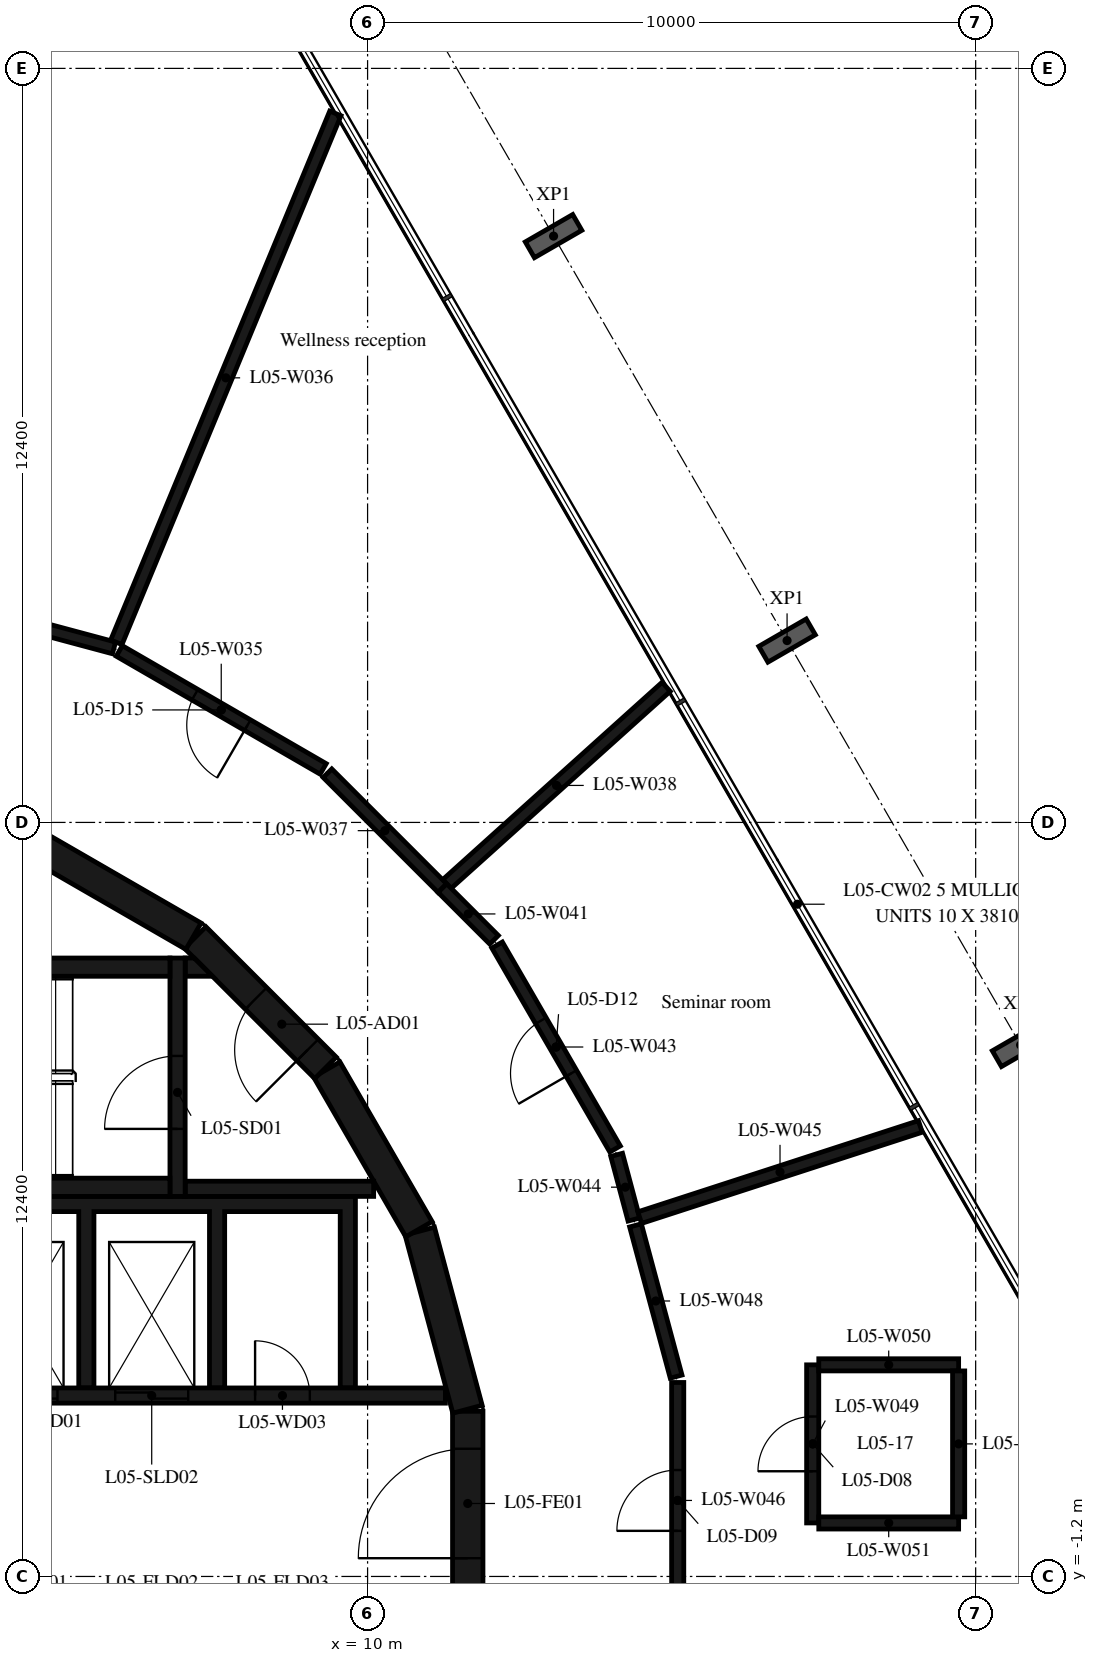
"""IFC4 building model, lengths in metres.
Left out: names, types, materials, properties, quantities, classifications, styles, units other than length and angle.
Written with IfcOpenShell. Run it as: python <this file> out.ifc"""

import sys

from ifc_helpers import new_model, si_unit, direction, frame, frame_2d, origin, origin_2d, place, context, subcontext, project, spatial, polyline, rectangle, i_section, outline, extrude, element, fill, save


model = new_model("IFC4")
c1 = context("Model", 3, precision=1e-05, world=origin(), true_north=direction((0.0, 1.0)))
c2 = subcontext(c1, "Body", "Model", "MODEL_VIEW")
j1 = project(units=[si_unit("LENGTHUNIT", "METRE"), si_unit("PLANEANGLEUNIT", "RADIAN")], contexts=[c1])
p1 = place(None, origin())
s1 = spatial("IfcSite", under=j1, at=p1, CompositionType="ELEMENT")
p2 = place(p1, origin())
s2 = spatial("IfcBuilding", under=s1, at=p2, CompositionType="ELEMENT")
p3 = place(p2, frame((0.0, 0.0, 28.2)))
s3 = spatial("IfcBuildingStorey", under=s2, at=p3, CompositionType="ELEMENT", Elevation=28.2)
for number, where, z_axis, x_axis in (
    (1, (20.739, 7.539, -0.38), (0.0, 0.0, 1.0), (0.5, -0.866, 0.0)),
    (2, (16.899, 14.19, -0.38), (0.0, 0.0, 1.0), (0.5, -0.866, 0.0)),
    (3, (13.059, 20.842, -0.38), (0.0, 0.0, 1.0), (0.5, -0.866, 0.0)),
):
    element("IfcColumn", number, at=place(p3, frame(where, z_axis=z_axis, x_axis=x_axis)), inside=s3, PredefinedType="COLUMN", context=c2, shape_type="SweptSolid", body=[
        extrude(i_section(OverallWidth=0.3, OverallDepth=0.9, WebThickness=0.019, FlangeThickness=0.035, FilletRadius=0.03, at=origin_2d()), origin(), (0.0, 0.0, 1.0), 4.73),
    ])
p4 = place(p3, frame((11.647, -1.516, 0.0), z_axis=(0.0, 0.0, 1.0), x_axis=(0.0, 1.0, 0.0)))
e4 = element("IfcWall", 4, at=p4, inside=s3, PredefinedType="SHEAR", context=c2, shape_type="SweptSolid", body=[
    extrude(rectangle(XDim=3.033, YDim=0.5, at=frame_2d((1.516, 0.0))), origin(), (0.0, 0.0, 1.0), 4.35),
])
p5 = place(p4, frame((0.616, 0.0, 0.0)))
e5 = element("IfcOpeningElement", 5, at=p5, cuts=e4, PredefinedType="OPENING", context=c2, shape_type="SweptSolid", body=[
    extrude(rectangle(XDim=1.8, YDim=2.1, at=frame_2d((0.9, 1.05))), frame((0.0, 0.26, 0.0), z_axis=(0.0, -1.0, 0.0), x_axis=(1.0, 0.0, 0.0)), (0.0, 0.0, 1.0), 0.52),
])
for number, where, z_axis, x_axis in (
    (6, (11.643, 1.55, 0.0), (0.0, 0.0, 1.0), (-0.259, 0.966, 0.0)),
    (7, (10.845, 4.51, 0.0), (0.0, 0.0, 1.0), (-0.5, 0.866, 0.0)),
):
    element("IfcWall", number, at=place(p3, frame(where, z_axis=z_axis, x_axis=x_axis)), inside=s3, PredefinedType="SHEAR", context=c2, shape_type="SweptSolid", body=[
        extrude(rectangle(XDim=3.033, YDim=0.5, at=frame_2d((1.516, 0.0))), origin(), (0.0, 0.0, 1.0), 4.35),
    ])
p6 = place(p3, frame((9.308, 7.164, 0.0), z_axis=(0.0, 0.0, 1.0), x_axis=(-0.707106781187, 0.707106781187, 0.0)))
e8 = element("IfcWall", 8, at=p6, inside=s3, PredefinedType="SHEAR", context=c2, shape_type="SweptSolid", body=[
    extrude(rectangle(XDim=3.032, YDim=0.5, at=frame_2d((1.516, 0.0))), origin(), (0.0, 0.0, 1.0), 4.35),
])
p7 = place(p6, frame((0.416, 0.0, 0.0)))
e9 = element("IfcOpeningElement", 9, at=p7, cuts=e8, PredefinedType="OPENING", context=c2, shape_type="SweptSolid", body=[
    extrude(rectangle(XDim=1.2, YDim=2.1, at=frame_2d((0.6, 1.05))), frame((0.0, 0.26, 0.0), z_axis=(0.0, -1.0, 0.0), x_axis=(1.0, 0.0, 0.0)), (0.0, 0.0, 1.0), 0.52),
])
p8 = place(p3, frame((7.137, 9.329, 0.0), z_axis=(0.0, 0.0, 1.0), x_axis=(-0.865975092491, 0.500087131594, 0.0)))
e10 = element("IfcWall", 10, at=p8, inside=s3, PredefinedType="SHEAR", context=c2, shape_type="SweptSolid", body=[
    extrude(rectangle(XDim=3.033, YDim=0.5, at=frame_2d((1.516, 0.0))), origin(), (0.0, 0.0, 1.0), 4.35),
])
for number, where, z_axis, x_axis in (
    (11, (0.0, 5.2, 0.0), (0.0, 0.0, 1.0), (1.0, 0.0, 0.0)),
    (12, (0.0, 8.82, 0.0), (0.0, 0.0, 1.0), (1.0, 0.0, 0.0)),
):
    element("IfcWall", number, at=place(p3, frame(where, z_axis=z_axis, x_axis=x_axis)), inside=s3, PredefinedType="SHEAR", context=c2, shape_type="SweptSolid", body=[
        extrude(rectangle(XDim=6.75, YDim=0.3, at=frame_2d((3.375, 0.0))), origin(), (0.0, 0.0, 1.0), 4.35),
    ])
p9 = place(p3, frame((6.875, 5.05, 0.0), z_axis=(0.0, 0.0, 1.0), x_axis=(0.0, 1.0, 0.0)))
e13 = element("IfcWall", 13, at=p9, inside=s3, PredefinedType="SHEAR", context=c2, shape_type="SweptSolid", body=[
    extrude(rectangle(XDim=3.92, YDim=0.25, at=frame_2d((1.96, 0.0))), origin(), (0.0, 0.0, 1.0), 4.35),
])
p10 = place(p9, frame((1.11, 0.0, 0.0)))
e14 = element("IfcOpeningElement", 14, at=p10, cuts=e13, PredefinedType="OPENING", context=c2, shape_type="SweptSolid", body=[
    extrude(rectangle(XDim=1.2, YDim=2.1, at=frame_2d((0.6, 1.05))), frame((0.0, 0.135, 0.0), z_axis=(0.0, -1.0, 0.0), x_axis=(1.0, 0.0, 0.0)), (0.0, 0.0, 1.0), 0.27),
])
p11 = place(p3, frame((7.0, 5.175, 0.0), z_axis=(0.0, 0.0, 1.0), x_axis=(1.0, 0.0, 0.0)))
e15 = element("IfcWall", 15, at=p11, inside=s3, PredefinedType="SHEAR", context=c2, shape_type="SweptSolid", body=[
    extrude(rectangle(XDim=3.1, YDim=0.25, at=frame_2d((1.55, 0.0))), origin(), (0.0, 0.0, 1.0), 4.35),
])
p12 = place(p3, origin())
e16 = element("IfcWall", 16, at=p12, inside=s3, PredefinedType="SHEAR", context=c2, shape_type="SweptSolid", body=[
    extrude(outline(polyline([(7.448, 8.67), (7.0, 8.67), (7.0, 8.97), (7.148, 8.97), (7.448, 8.67)])), origin(), (0.0, 0.0, 1.0), 4.35),
])
p13 = place(p3, origin())
e17 = element("IfcWall", 17, at=p13, inside=s3, PredefinedType="SHEAR", context=c2, shape_type="SweptSolid", body=[
    extrude(outline(polyline([(-9.55, 4.8), (-7.65, 4.8), (-7.65, 1.9), (-7.4, 1.9), (-7.4, 4.8), (-5.5, 4.8), (-5.5, 1.9), (-5.25, 1.9), (-5.25, 4.8), (-3.35, 4.8), (-3.35, 1.9), (-3.1, 1.9), (-3.1, 4.8), (-1.2, 4.8), (-1.2, 1.9), (-0.95, 1.9), (-0.95, 4.8), (0.95, 4.8), (0.95, 1.9), (1.2, 1.9), (1.2, 4.8), (3.1, 4.8), (3.1, 1.9), (3.35, 1.9), (3.35, 4.8), (5.25, 4.8), (5.25, 1.9), (5.5, 1.9), (5.5, 4.8), (7.4, 4.8), (7.4, 1.9), (7.65, 1.9), (7.65, 4.8), (9.55, 4.8), (9.55, 1.9), (9.8, 1.9), (9.8, 4.8), (9.8, 5.05), (-9.8, 5.05), (-9.8, 4.8), (-9.8, 1.9), (-9.55, 1.9), (-9.55, 4.8)])), origin(), (0.0, 0.0, 1.0), 4.35),
])
p14 = place(p3, frame((3.35, 1.775, 0.0), z_axis=(0.0, 0.0, 1.0), x_axis=(1.0, 0.0, 0.0)))
e18 = element("IfcWall", 18, at=p14, inside=s3, PredefinedType="SHEAR", context=c2, shape_type="SweptSolid", body=[
    extrude(rectangle(XDim=7.93, YDim=0.25, at=frame_2d((3.965, 0.0))), origin(), (0.0, 0.0, 1.0), 4.35),
])
p15 = place(p14, frame((0.35, 0.0, 0.0)))
e19 = element("IfcOpeningElement", 19, at=p15, cuts=e18, PredefinedType="OPENING", context=c2, shape_type="SweptSolid", body=[
    extrude(rectangle(XDim=1.2, YDim=2.4, at=frame_2d((0.6, 1.2))), frame((0.0, 0.135, 0.0), z_axis=(0.0, -1.0, 0.0), x_axis=(1.0, 0.0, 0.0)), (0.0, 0.0, 1.0), 0.27),
])
p16 = place(p14, frame((2.5, 0.0, 0.0)))
e20 = element("IfcOpeningElement", 20, at=p16, cuts=e18, PredefinedType="OPENING", context=c2, shape_type="SweptSolid", body=[
    extrude(rectangle(XDim=1.2, YDim=2.4, at=frame_2d((0.6, 1.2))), frame((0.0, 0.135, 0.0), z_axis=(0.0, -1.0, 0.0), x_axis=(1.0, 0.0, 0.0)), (0.0, 0.0, 1.0), 0.27),
])
p17 = place(p14, frame((4.8, 0.0, 0.0)))
e21 = element("IfcOpeningElement", 21, at=p17, cuts=e18, PredefinedType="OPENING", context=c2, shape_type="SweptSolid", body=[
    extrude(rectangle(XDim=0.9, YDim=2.1, at=frame_2d((0.45, 1.05))), frame((0.0, 0.135, 0.0), z_axis=(0.0, -1.0, 0.0), x_axis=(1.0, 0.0, 0.0)), (0.0, 0.0, 1.0), 0.27),
])
p18 = place(p3, frame((5.83, 14.07, 0.0), z_axis=(0.0, 0.0, 1.0), x_axis=(-0.965870133458, 0.259026804199, 0.0)))
e22 = element("IfcWall", 22, at=p18, inside=s3, PredefinedType="PARTITIONING", context=c2, shape_type="SweptSolid", body=[
    extrude(rectangle(XDim=3.876, YDim=0.2, at=frame_2d((1.938, 0.0))), origin(), (0.0, 0.0, 1.0), 4.35),
])
p19 = place(p3, frame((9.27, 12.08, 0.0), z_axis=(0.0, 0.0, 1.0), x_axis=(-0.865601686425, 0.500733182901, 0.0)))
e23 = element("IfcWall", 23, at=p19, inside=s3, PredefinedType="PARTITIONING", context=c2, shape_type="SweptSolid", body=[
    extrude(rectangle(XDim=3.874, YDim=0.2, at=frame_2d((1.937, 0.0))), origin(), (0.0, 0.0, 1.0), 4.35),
])
p20 = place(p19, frame((1.437, 0.0, 0.0)))
e24 = element("IfcOpeningElement", 24, at=p20, cuts=e23, PredefinedType="OPENING", context=c2, shape_type="SweptSolid", body=[
    extrude(rectangle(XDim=1.0, YDim=2.1, at=frame_2d((0.5, 1.05))), frame((0.0, 0.11, 0.0), z_axis=(0.0, -1.0, 0.0), x_axis=(1.0, 0.0, 0.0)), (0.0, 0.0, 1.0), 0.22),
])
p21 = place(p3, frame((9.47, 22.86, 0.0), z_axis=(0.0, 0.0, 1.0), x_axis=(-0.382599926304, -0.923914117433, 0.0)))
e25 = element("IfcWall", 25, at=p21, inside=s3, PredefinedType="PARTITIONING", context=c2, shape_type="SweptSolid", body=[
    extrude(rectangle(XDim=9.414, YDim=0.2, at=frame_2d((4.707, 0.0))), origin(), (0.0, 0.0, 1.0), 4.35),
])
p22 = place(p3, frame((11.23, 10.12, 0.0), z_axis=(0.0, 0.0, 1.0), x_axis=(-0.707106781187, 0.707106781187, 0.0)))
e26 = element("IfcWall", 26, at=p22, inside=s3, PredefinedType="PARTITIONING", context=c2, shape_type="SweptSolid", body=[
    extrude(rectangle(XDim=2.672, YDim=0.2, at=frame_2d((1.336, 0.0))), origin(), (0.0, 0.0, 1.0), 4.35),
])
p23 = place(p3, frame((11.304, 10.187, 0.0), z_axis=(0.0, 0.0, 1.0), x_axis=(0.743474354937, 0.668764445489, 0.0)))
e27 = element("IfcWall", 27, at=p23, inside=s3, PredefinedType="PARTITIONING", context=c2, shape_type="SweptSolid", body=[
    extrude(rectangle(XDim=4.849, YDim=0.2, at=frame_2d((2.425, 0.0))), origin(), (0.0, 0.0, 1.0), 3.96),
])
p24 = place(p3, frame((12.08, 9.27, 0.0), z_axis=(0.0, 0.0, 1.0), x_axis=(-0.707106781187, 0.707106781187, 0.0)))
e28 = element("IfcWall", 28, at=p24, inside=s3, PredefinedType="PARTITIONING", context=c2, shape_type="SweptSolid", body=[
    extrude(rectangle(XDim=1.202, YDim=0.2, at=frame_2d((0.601, 0.0))), origin(), (0.0, 0.0, 1.0), 4.35),
])
p25 = place(p3, frame((14.07, 5.83, 0.0), z_axis=(0.0, 0.0, 1.0), x_axis=(-0.500760497952, 0.865585884642, 0.0)))
e29 = element("IfcWall", 29, at=p25, inside=s3, PredefinedType="PARTITIONING", context=c2, shape_type="SweptSolid", body=[
    extrude(rectangle(XDim=3.874, YDim=0.2, at=frame_2d((1.937, 0.0))), origin(), (0.0, 0.0, 1.0), 4.35),
])
p26 = place(p25, frame((1.437, 0.0, 0.0)))
e30 = element("IfcOpeningElement", 30, at=p26, cuts=e29, PredefinedType="OPENING", context=c2, shape_type="SweptSolid", body=[
    extrude(rectangle(XDim=1.0, YDim=2.1, at=frame_2d((0.5, 1.05))), frame((0.0, 0.11, 0.0), z_axis=(0.0, -1.0, 0.0), x_axis=(1.0, 0.0, 0.0)), (0.0, 0.0, 1.0), 0.22),
])
p27 = place(p3, frame((14.38, 4.67, 0.0), z_axis=(0.0, 0.0, 1.0), x_axis=(-0.258159565639, 0.966102292032, 0.0)))
e31 = element("IfcWall", 31, at=p27, inside=s3, PredefinedType="PARTITIONING", context=c2, shape_type="SweptSolid", body=[
    extrude(rectangle(XDim=1.101, YDim=0.2, at=frame_2d((0.55, 0.0))), origin(), (0.0, 0.0, 1.0), 4.35),
])
p28 = place(p3, frame((14.475, 4.701, 0.0), z_axis=(0.0, 0.0, 1.0), x_axis=(0.951085450377, 0.308927930239, 0.0)))
e32 = element("IfcWall", 32, at=p28, inside=s3, PredefinedType="PARTITIONING", context=c2, shape_type="SweptSolid", body=[
    extrude(rectangle(XDim=4.852, YDim=0.2, at=frame_2d((2.426, 0.0))), origin(), (0.0, 0.0, 1.0), 3.96),
])
p29 = place(p3, frame((15.1, -1.89, 0.0), z_axis=(0.0, 0.0, 1.0), x_axis=(0.0, 1.0, 0.0)))
e33 = element("IfcWall", 33, at=p29, inside=s3, PredefinedType="PARTITIONING", context=c2, shape_type="SweptSolid", body=[
    extrude(rectangle(XDim=3.88, YDim=0.2, at=frame_2d((1.94, 0.0))), origin(), (0.0, 0.0, 1.0), 4.35),
])
p30 = place(p29, frame((1.44, 0.0, 0.0)))
e34 = element("IfcOpeningElement", 34, at=p30, cuts=e33, PredefinedType="OPENING", context=c2, shape_type="SweptSolid", body=[
    extrude(rectangle(XDim=1.0, YDim=2.1, at=frame_2d((0.5, 1.05))), frame((0.0, 0.11, 0.0), z_axis=(0.0, -1.0, 0.0), x_axis=(1.0, 0.0, 0.0)), (0.0, 0.0, 1.0), 0.22),
])
p31 = place(p3, frame((15.074, 2.087, 0.0), z_axis=(0.0, 0.0, 1.0), x_axis=(-0.259408996071, 0.965767556277, 0.0)))
e35 = element("IfcWall", 35, at=p31, inside=s3, PredefinedType="PARTITIONING", context=c2, shape_type="SweptSolid", body=[
    extrude(rectangle(XDim=2.575, YDim=0.2, at=frame_2d((1.288, 0.0))), origin(), (0.0, 0.0, 1.0), 4.35),
])
p32 = place(p3, frame((17.32, -0.32, 0.0), z_axis=(0.0, 0.0, 1.0), x_axis=(0.0, 1.0, 0.0)))
e36 = element("IfcWall", 36, at=p32, inside=s3, PredefinedType="PARTITIONING", context=c2, shape_type="SweptSolid", body=[
    extrude(rectangle(XDim=2.6, YDim=0.2, at=frame_2d((1.3, 0.0))), origin(), (0.0, 0.0, 1.0), 4.35),
])
p33 = place(p32, frame((0.85, 0.0, 0.0)))
e37 = element("IfcOpeningElement", 37, at=p33, cuts=e36, PredefinedType="OPENING", context=c2, shape_type="SweptSolid", body=[
    extrude(rectangle(XDim=0.9, YDim=2.1, at=frame_2d((0.45, 1.05))), frame((0.0, 0.11, 0.0), z_axis=(0.0, -1.0, 0.0), x_axis=(1.0, 0.0, 0.0)), (0.0, 0.0, 1.0), 0.22),
])
for number, where, z_axis, x_axis in (
    (38, (17.42, 2.28, 0.0), (0.0, 0.0, 1.0), (1.0, 0.0, 0.0)),
    (39, (19.72, -0.32, 0.0), (0.0, 0.0, 1.0), (-1.0, 0.0, 0.0)),
):
    element("IfcWall", number, at=place(p3, frame(where, z_axis=z_axis, x_axis=x_axis)), inside=s3, PredefinedType="PARTITIONING", context=c2, shape_type="SweptSolid", body=[
        extrude(rectangle(XDim=2.3, YDim=0.2, at=frame_2d((1.15, 0.0))), origin(), (0.0, 0.0, 1.0), 4.35),
    ])
p34 = place(p3, frame((19.72, 2.18, 0.0), z_axis=(0.0, 0.0, 1.0), x_axis=(0.0, -1.0, 0.0)))
e40 = element("IfcWall", 40, at=p34, inside=s3, PredefinedType="PARTITIONING", context=c2, shape_type="SweptSolid", body=[
    extrude(rectangle(XDim=2.4, YDim=0.2, at=frame_2d((1.2, 0.0))), origin(), (0.0, 0.0, 1.0), 4.35),
])
p35 = place(p10, origin())
e41 = element("IfcDoor", 41, at=p35, inside=s3, OperationType="SINGLE_SWING_LEFT", PredefinedType="DOOR", context=c2, shape_type="SweptSolid", body=[
    extrude(rectangle(XDim=1.2, YDim=2.1, at=frame_2d((0.6, 1.05))), frame((0.0, 0.025, 0.0), z_axis=(0.0, -1.0, 0.0), x_axis=(1.0, 0.0, 0.0)), (0.0, 0.0, 1.0), 0.05),
])
fill(e14, e41)
p36 = place(p7, origin())
e42 = element("IfcDoor", 42, at=p36, inside=s3, OperationType="SINGLE_SWING_RIGHT", PredefinedType="DOOR", context=c2, shape_type="SweptSolid", body=[
    extrude(rectangle(XDim=1.2, YDim=2.1, at=frame_2d((0.6, 1.05))), frame((0.0, 0.025, 0.0), z_axis=(0.0, -1.0, 0.0), x_axis=(1.0, 0.0, 0.0)), (0.0, 0.0, 1.0), 0.05),
])
fill(e9, e42)
p37 = place(p5, origin())
e43 = element("IfcDoor", 43, at=p37, inside=s3, OperationType="DOUBLE_DOOR_SINGLE_SWING", PredefinedType="DOOR", context=c2, shape_type="SweptSolid", body=[
    extrude(rectangle(XDim=1.8, YDim=2.1, at=frame_2d((0.9, 1.05))), frame((0.0, 0.025, 0.0), z_axis=(0.0, -1.0, 0.0), x_axis=(1.0, 0.0, 0.0)), (0.0, 0.0, 1.0), 0.05),
])
fill(e5, e43)
p38 = place(p15, origin())
e44 = element("IfcDoor", 44, at=p38, inside=s3, OperationType="DOUBLE_DOOR_SLIDING", PredefinedType="DOOR", context=c2, shape_type="SweptSolid", body=[
    extrude(rectangle(XDim=1.2, YDim=2.4, at=frame_2d((0.6, 1.2))), frame((0.0, 0.025, 0.0), z_axis=(0.0, -1.0, 0.0), x_axis=(1.0, 0.0, 0.0)), (0.0, 0.0, 1.0), 0.05),
])
fill(e19, e44)
p39 = place(p16, origin())
e45 = element("IfcDoor", 45, at=p39, inside=s3, OperationType="DOUBLE_DOOR_SLIDING", PredefinedType="DOOR", context=c2, shape_type="SweptSolid", body=[
    extrude(rectangle(XDim=1.2, YDim=2.4, at=frame_2d((0.6, 1.2))), frame((0.0, 0.025, 0.0), z_axis=(0.0, -1.0, 0.0), x_axis=(1.0, 0.0, 0.0)), (0.0, 0.0, 1.0), 0.05),
])
fill(e20, e45)
p40 = place(p17, origin())
e46 = element("IfcDoor", 46, at=p40, inside=s3, OperationType="SINGLE_SWING_RIGHT", PredefinedType="DOOR", context=c2, shape_type="SweptSolid", body=[
    extrude(rectangle(XDim=0.9, YDim=2.1, at=frame_2d((0.45, 1.05))), frame((0.0, 0.025, 0.0), z_axis=(0.0, -1.0, 0.0), x_axis=(1.0, 0.0, 0.0)), (0.0, 0.0, 1.0), 0.05),
])
fill(e21, e46)
p41 = place(p33, origin())
e47 = element("IfcDoor", 47, at=p41, inside=s3, OperationType="SINGLE_SWING_LEFT", PredefinedType="DOOR", context=c2, shape_type="SweptSolid", body=[
    extrude(rectangle(XDim=0.9, YDim=2.1, at=frame_2d((0.45, 1.05))), frame((0.0, 0.025, 0.0), z_axis=(0.0, -1.0, 0.0), x_axis=(1.0, 0.0, 0.0)), (0.0, 0.0, 1.0), 0.05),
])
fill(e37, e47)
p42 = place(p30, origin())
e48 = element("IfcDoor", 48, at=p42, inside=s3, OperationType="SINGLE_SWING_LEFT", PredefinedType="DOOR", context=c2, shape_type="SweptSolid", body=[
    extrude(rectangle(XDim=1.0, YDim=2.1, at=frame_2d((0.5, 1.05))), frame((0.0, 0.025, 0.0), z_axis=(0.0, -1.0, 0.0), x_axis=(1.0, 0.0, 0.0)), (0.0, 0.0, 1.0), 0.05),
])
fill(e34, e48)
p43 = place(p26, origin())
e49 = element("IfcDoor", 49, at=p43, inside=s3, OperationType="SINGLE_SWING_LEFT", PredefinedType="DOOR", context=c2, shape_type="SweptSolid", body=[
    extrude(rectangle(XDim=1.0, YDim=2.1, at=frame_2d((0.5, 1.05))), frame((0.0, 0.025, 0.0), z_axis=(0.0, -1.0, 0.0), x_axis=(1.0, 0.0, 0.0)), (0.0, 0.0, 1.0), 0.05),
])
fill(e30, e49)
p44 = place(p20, origin())
e50 = element("IfcDoor", 50, at=p44, inside=s3, OperationType="SINGLE_SWING_LEFT", PredefinedType="DOOR", context=c2, shape_type="SweptSolid", body=[
    extrude(rectangle(XDim=1.0, YDim=2.1, at=frame_2d((0.5, 1.05))), frame((0.0, 0.025, 0.0), z_axis=(0.0, -1.0, 0.0), x_axis=(1.0, 0.0, 0.0)), (0.0, 0.0, 1.0), 0.05),
])
fill(e24, e50)
save(model, sys.argv[1])
